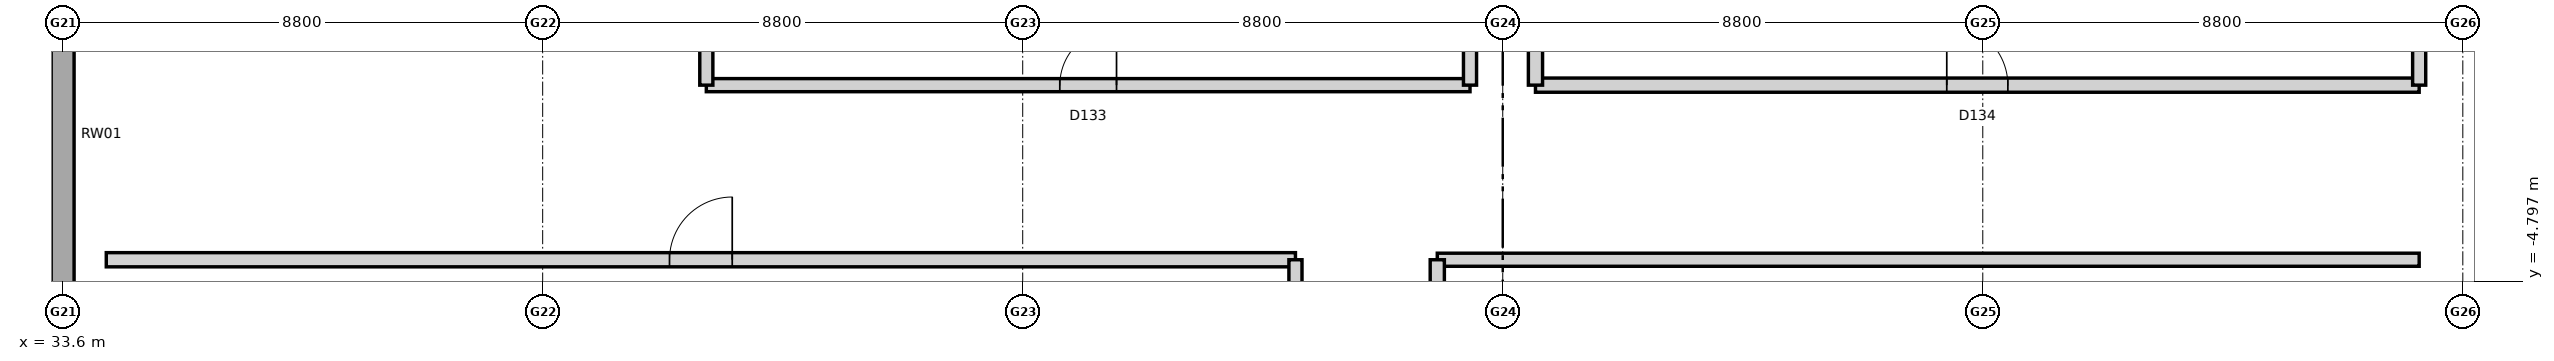
"""IFC4 building model, lengths in metres.
Left out: names, types, materials, properties, quantities, classifications, styles, units other than length and angle.
Written with IfcOpenShell. Run it as: python <this file> out.ifc"""

import sys

from ifc_helpers import new_model, si_unit, direction, frame, frame_2d, origin, place, context, subcontext, project, spatial, rectangle, extrude, element, fill, save


model = new_model("IFC4")
c1 = context("Model", 3, precision=1e-05, world=origin(), true_north=direction((0.0, 1.0)))
c2 = subcontext(c1, "Body", "Model", "MODEL_VIEW")
j1 = project(units=[si_unit("LENGTHUNIT", "METRE"), si_unit("PLANEANGLEUNIT", "RADIAN")], contexts=[c1])
p1 = place(None, origin())
s1 = spatial("IfcSite", under=j1, at=p1, CompositionType="ELEMENT")
p2 = place(p1, origin())
s2 = spatial("IfcBuilding", under=s1, at=p2, CompositionType="ELEMENT")
p3 = place(p2, frame((0.0, 0.0, -5.4)))
s3 = spatial("IfcBuildingStorey", under=s2, at=p3, CompositionType="ELEMENT", Elevation=-5.4)
p4 = place(p3, frame((33.6, -37.35, 0.0), z_axis=(0.0, 0.0, 1.0), x_axis=(0.0, 1.0, 0.0)))
e1 = element("IfcWall", 1, at=p4, inside=s3, PredefinedType="USERDEFINED", context=c2, shape_type="SweptSolid", body=[
    extrude(rectangle(XDim=70.5, YDim=0.42, at=frame_2d((35.25, 0.0))), origin(), (0.0, 0.0, 1.0), 5.11),
])
p5 = place(p3, frame((34.4, -4.4, 0.0), z_axis=(0.0, 0.0, 1.0), x_axis=(1.0, 0.0, 0.0)))
e2 = element("IfcWall", 2, at=p5, inside=s3, PredefinedType="PARTITIONING", context=c2, shape_type="SweptSolid", body=[
    extrude(rectangle(XDim=21.8, YDim=0.26, at=frame_2d((10.9, 0.0))), origin(), (0.0, 0.0, 1.0), 5.02),
])
p6 = place(p5, frame((10.325, 0.0, 0.0)))
e3 = element("IfcOpeningElement", 3, at=p6, cuts=e2, PredefinedType="OPENING", context=c2, shape_type="SweptSolid", body=[
    extrude(rectangle(XDim=1.15, YDim=2.3, at=frame_2d((0.575, 1.15))), frame((0.0, 0.14, 0.0), z_axis=(0.0, -1.0, 0.0), x_axis=(1.0, 0.0, 0.0)), (0.0, 0.0, 1.0), 0.28),
])
p7 = place(p3, frame((56.2, -28.0, 0.0), z_axis=(0.0, 0.0, 1.0), x_axis=(0.0, 1.0, 0.0)))
e4 = element("IfcWall", 4, at=p7, inside=s3, PredefinedType="PARTITIONING", context=c2, shape_type="SweptSolid", body=[
    extrude(rectangle(XDim=23.6, YDim=0.24, at=frame_2d((11.8, 0.0))), origin(), (0.0, 0.0, 1.0), 5.02),
])
p8 = place(p3, frame((58.8, -4.4, 0.0), z_axis=(0.0, 0.0, 1.0), x_axis=(1.0, 0.0, 0.0)))
e5 = element("IfcWall", 5, at=p8, inside=s3, PredefinedType="PARTITIONING", context=c2, shape_type="SweptSolid", body=[
    extrude(rectangle(XDim=18.0, YDim=0.24, at=frame_2d((9.0, 0.0))), origin(), (0.0, 0.0, 1.0), 5.02),
])
p9 = place(p3, frame((58.8, -28.0, 0.0), z_axis=(0.0, 0.0, 1.0), x_axis=(0.0, 1.0, 0.0)))
e6 = element("IfcWall", 6, at=p9, inside=s3, PredefinedType="PARTITIONING", context=c2, shape_type="SweptSolid", body=[
    extrude(rectangle(XDim=23.6, YDim=0.26, at=frame_2d((11.8, 0.0))), origin(), (0.0, 0.0, 1.0), 5.02),
])
p10 = place(p3, frame((45.4, -1.2, 0.0), z_axis=(0.0, 0.0, 1.0), x_axis=(1.0, 0.0, 0.0)))
e7 = element("IfcWall", 7, at=p10, inside=s3, PredefinedType="PARTITIONING", context=c2, shape_type="SweptSolid", body=[
    extrude(rectangle(XDim=14.0, YDim=0.24, at=frame_2d((7.0, 0.0))), origin(), (0.0, 0.0, 1.0), 5.02),
])
p11 = place(p10, frame((6.48, 0.0, 0.0)))
e8 = element("IfcOpeningElement", 8, at=p11, cuts=e7, PredefinedType="OPENING", context=c2, shape_type="SweptSolid", body=[
    extrude(rectangle(XDim=1.04, YDim=2.2, at=frame_2d((0.52, 1.1))), frame((0.0, 0.13, 0.0), z_axis=(0.0, -1.0, 0.0), x_axis=(1.0, 0.0, 0.0)), (0.0, 0.0, 1.0), 0.26),
])
p12 = place(p3, frame((45.4, -1.2, 0.0), z_axis=(0.0, 0.0, 1.0), x_axis=(0.0, 1.0, 0.0)))
e9 = element("IfcWall", 9, at=p12, inside=s3, PredefinedType="PARTITIONING", context=c2, shape_type="SweptSolid", body=[
    extrude(rectangle(XDim=20.5, YDim=0.24, at=frame_2d((10.25, 0.0))), origin(), (0.0, 0.0, 1.0), 4.521),
])
p13 = place(p3, frame((59.4, -1.2, 0.0), z_axis=(0.0, 0.0, 1.0), x_axis=(0.0, 1.0, 0.0)))
e10 = element("IfcWall", 10, at=p13, inside=s3, PredefinedType="PARTITIONING", context=c2, shape_type="SweptSolid", body=[
    extrude(rectangle(XDim=25.6, YDim=0.24, at=frame_2d((12.8, 0.0))), origin(), (0.0, 0.0, 1.0), 5.02),
])
p14 = place(p3, frame((60.6, -1.2, 0.0), z_axis=(0.0, 0.0, 1.0), x_axis=(1.0, 0.0, 0.0)))
e11 = element("IfcWall", 11, at=p14, inside=s3, PredefinedType="PARTITIONING", context=c2, shape_type="SweptSolid", body=[
    extrude(rectangle(XDim=16.2, YDim=0.26, at=frame_2d((8.1, 0.0))), origin(), (0.0, 0.0, 1.0), 5.02),
])
p15 = place(p14, frame((7.54, 0.0, 0.0)))
e12 = element("IfcOpeningElement", 12, at=p15, cuts=e11, PredefinedType="OPENING", context=c2, shape_type="SweptSolid", body=[
    extrude(rectangle(XDim=1.12, YDim=2.25, at=frame_2d((0.56, 1.125))), frame((0.0, 0.14, 0.0), z_axis=(0.0, -1.0, 0.0), x_axis=(1.0, 0.0, 0.0)), (0.0, 0.0, 1.0), 0.28),
])
p16 = place(p3, frame((60.6, -1.2, 0.0), z_axis=(0.0, 0.0, 1.0), x_axis=(0.0, 1.0, 0.0)))
e13 = element("IfcWall", 13, at=p16, inside=s3, PredefinedType="PARTITIONING", context=c2, shape_type="SweptSolid", body=[
    extrude(rectangle(XDim=25.6, YDim=0.26, at=frame_2d((12.8, 0.0))), origin(), (0.0, 0.0, 1.0), 5.02),
])
p17 = place(p3, frame((76.8, -1.2, 0.0), z_axis=(0.0, 0.0, 1.0), x_axis=(0.0, 1.0, 0.0)))
e14 = element("IfcWall", 14, at=p17, inside=s3, PredefinedType="PARTITIONING", context=c2, shape_type="SweptSolid", body=[
    extrude(rectangle(XDim=25.6, YDim=0.24, at=frame_2d((12.8, 0.0))), origin(), (0.0, 0.0, 1.0), 5.02),
])
p18 = place(p6, origin())
e15 = element("IfcDoor", 15, at=p18, inside=s3, OperationType="SINGLE_SWING_RIGHT", PredefinedType="DOOR", context=c2, shape_type="SweptSolid", body=[
    extrude(rectangle(XDim=1.15, YDim=2.3, at=frame_2d((0.575, 1.15))), frame((0.0, 0.025, 0.0), z_axis=(0.0, -1.0, 0.0), x_axis=(1.0, 0.0, 0.0)), (0.0, 0.0, 1.0), 0.05),
])
fill(e3, e15)
p19 = place(p11, origin())
e16 = element("IfcDoor", 16, at=p19, inside=s3, OperationType="SINGLE_SWING_RIGHT", PredefinedType="DOOR", context=c2, shape_type="SweptSolid", body=[
    extrude(rectangle(XDim=1.04, YDim=2.2, at=frame_2d((0.52, 1.1))), frame((0.0, 0.025, 0.0), z_axis=(0.0, -1.0, 0.0), x_axis=(1.0, 0.0, 0.0)), (0.0, 0.0, 1.0), 0.05),
])
fill(e8, e16)
p20 = place(p15, origin())
e17 = element("IfcDoor", 17, at=p20, inside=s3, OperationType="SINGLE_SWING_LEFT", PredefinedType="DOOR", context=c2, shape_type="SweptSolid", body=[
    extrude(rectangle(XDim=1.12, YDim=2.25, at=frame_2d((0.56, 1.125))), frame((0.0, 0.025, 0.0), z_axis=(0.0, -1.0, 0.0), x_axis=(1.0, 0.0, 0.0)), (0.0, 0.0, 1.0), 0.05),
])
fill(e12, e17)
save(model, sys.argv[1])
